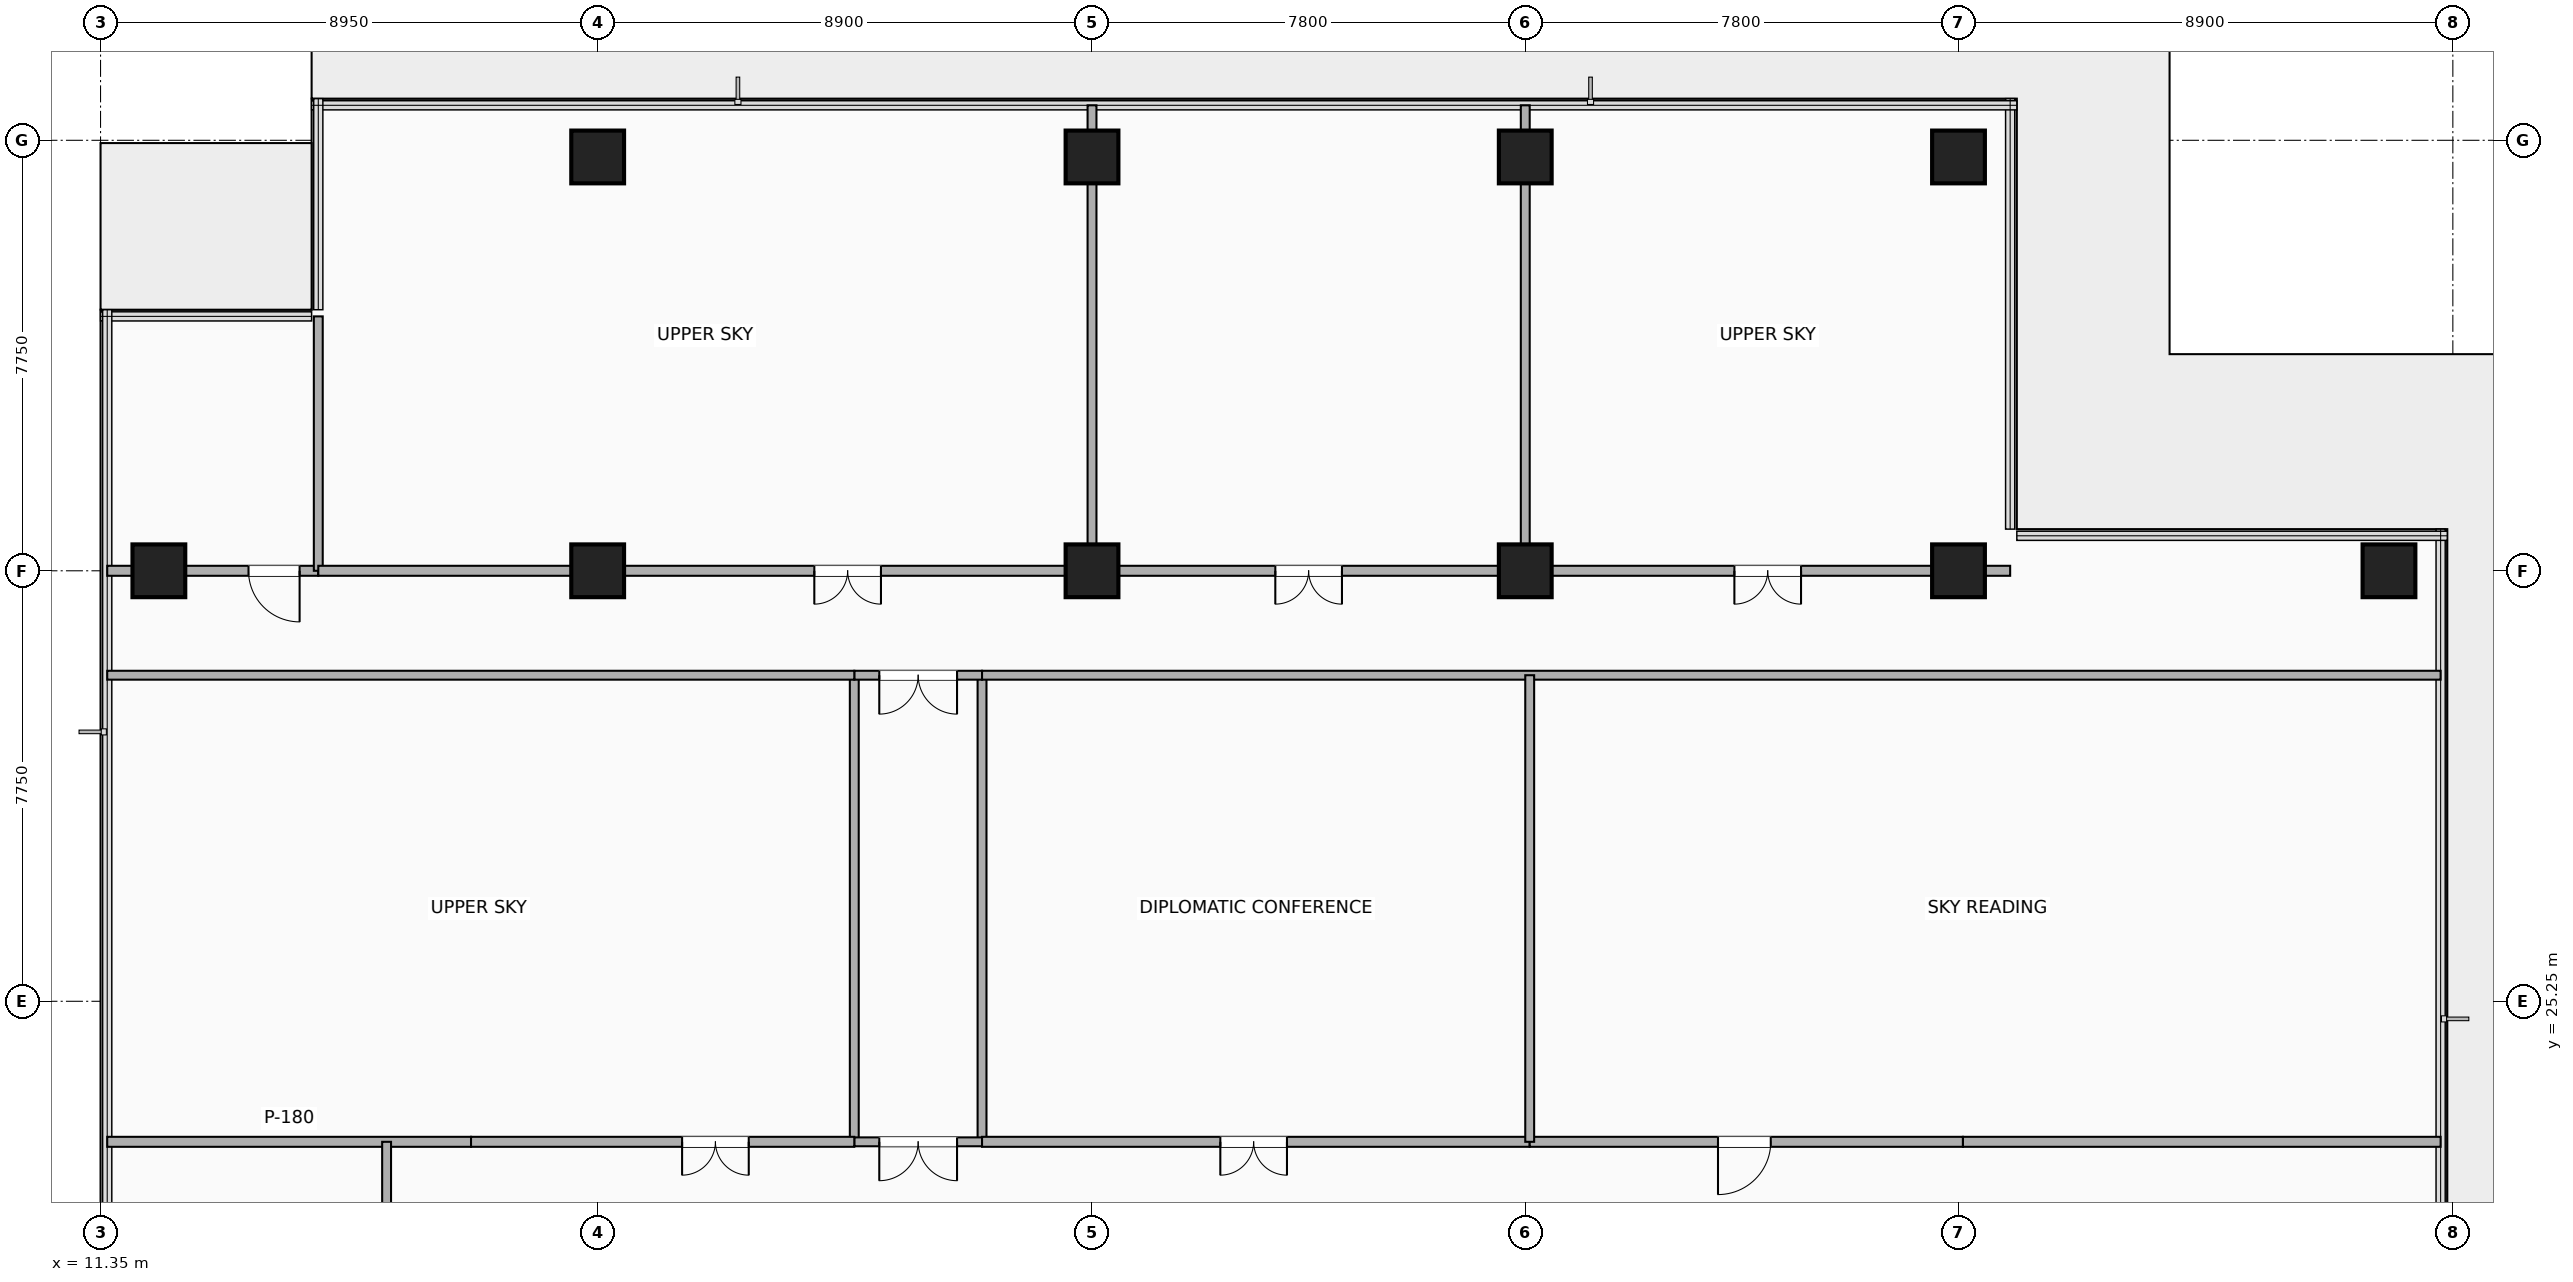
"""IFC4 building model, lengths in metres.
Left out: names, types, materials, properties, quantities, classifications, styles, units other than length and angle.
Written with IfcOpenShell. Run it as: python <this file> out.ifc"""

import sys

from ifc_helpers import new_model, si_unit, direction, frame, frame_2d, origin, origin_2d, place, context, subcontext, project, spatial, rectangle, extrude, element, fill, save


model = new_model("IFC4")
c1 = context("Model", 3, precision=1e-05, world=origin(), true_north=direction((0.0, 1.0)))
c2 = subcontext(c1, "Body", "Model", "MODEL_VIEW")
j1 = project(units=[si_unit("LENGTHUNIT", "METRE"), si_unit("PLANEANGLEUNIT", "RADIAN")], contexts=[c1])
p1 = place(None, origin())
s1 = spatial("IfcSite", under=j1, at=p1, CompositionType="ELEMENT")
p2 = place(p1, origin())
s2 = spatial("IfcBuilding", under=s1, at=p2, CompositionType="ELEMENT")
p3 = place(p2, frame((0.0, 0.0, 192.5)))
s3 = spatial("IfcBuildingStorey", under=s2, at=p3, CompositionType="ELEMENT", Elevation=192.5)
for number, where, z_axis, x_axis in (
    (1, (20.3, 33.0, -0.24), (0.0, 0.0, 1.0), (1.0, 0.0, 0.0)),
    (2, (29.2, 33.0, -0.24), (0.0, 0.0, 1.0), (1.0, 0.0, 0.0)),
    (3, (37.0, 33.0, -0.24), (0.0, 0.0, 1.0), (1.0, 0.0, 0.0)),
    (4, (44.8, 33.0, -0.24), (0.0, 0.0, 1.0), (1.0, 0.0, 0.0)),
    (5, (12.4, 33.0, -0.24), (0.0, 0.0, 1.0), (1.0, 0.0, 0.0)),
    (6, (52.55, 33.0, -0.24), (0.0, 0.0, 1.0), (1.0, 0.0, 0.0)),
    (7, (20.3, 40.45, -0.24), (0.0, 0.0, 1.0), (1.0, 0.0, 0.0)),
    (8, (29.2, 40.45, -0.24), (0.0, 0.0, 1.0), (1.0, 0.0, 0.0)),
    (9, (37.0, 40.45, -0.24), (0.0, 0.0, 1.0), (1.0, 0.0, 0.0)),
    (10, (44.8, 40.45, -0.24), (0.0, 0.0, 1.0), (1.0, 0.0, 0.0)),
):
    element("IfcColumn", number, at=place(p3, frame(where, z_axis=z_axis, x_axis=x_axis)), inside=s3, PredefinedType="COLUMN", context=c2, shape_type="SweptSolid", body=[
        extrude(rectangle(XDim=0.95, YDim=0.95, at=origin_2d()), origin(), (0.0, 0.0, 1.0), 4.4),
    ])
p4 = place(p3, frame((11.47, 22.72, 0.0), z_axis=(0.0, 0.0, 1.0), x_axis=(1.0, 0.0, 0.0)))
e11 = element("IfcWall", 11, at=p4, inside=s3, PredefinedType="PARTITIONING", context=c2, shape_type="SweptSolid", body=[
    extrude(rectangle(XDim=6.55, YDim=0.18, at=frame_2d((3.275, 0.0))), origin(), (0.0, 0.0, 1.0), 3.682),
])
p5 = place(p3, frame((16.5, 18.52, 0.0), z_axis=(0.0, 0.0, 1.0), x_axis=(0.0, 1.0, 0.0)))
e12 = element("IfcWall", 12, at=p5, inside=s3, PredefinedType="PARTITIONING", context=c2, shape_type="SweptSolid", body=[
    extrude(rectangle(XDim=4.2, YDim=0.16, at=frame_2d((2.1, 0.0))), origin(), (0.0, 0.0, 1.0), 3.372),
])
p6 = place(p5, frame((0.693, 0.0, 0.0)))
e13 = element("IfcOpeningElement", 13, at=p6, cuts=e12, PredefinedType="OPENING", context=c2, shape_type="SweptSolid", body=[
    extrude(rectangle(XDim=0.92, YDim=2.08, at=frame_2d((0.46, 1.04))), frame((0.0, 0.09, 0.0), z_axis=(0.0, -1.0, 0.0), x_axis=(1.0, 0.0, 0.0)), (0.0, 0.0, 1.0), 0.18),
])
p7 = place(p3, frame((11.47, 33.0, 0.0), z_axis=(0.0, 0.0, 1.0), x_axis=(1.0, 0.0, 0.0)))
e14 = element("IfcWall", 14, at=p7, inside=s3, PredefinedType="PARTITIONING", context=c2, shape_type="SweptSolid", body=[
    extrude(rectangle(XDim=3.8, YDim=0.18, at=frame_2d((1.9, 0.0))), origin(), (0.0, 0.0, 1.0), 3.372),
])
p8 = place(p7, frame((2.544, 0.0, 0.0)))
e15 = element("IfcOpeningElement", 15, at=p8, cuts=e14, PredefinedType="OPENING", context=c2, shape_type="SweptSolid", body=[
    extrude(rectangle(XDim=0.92, YDim=2.08, at=frame_2d((0.46, 1.04))), frame((0.0, 0.1, 0.0), z_axis=(0.0, -1.0, 0.0), x_axis=(1.0, 0.0, 0.0)), (0.0, 0.0, 1.0), 0.2),
])
p9 = place(p3, frame((15.27, 33.0, 0.0), z_axis=(0.0, 0.0, 1.0), x_axis=(0.0, 1.0, 0.0)))
e16 = element("IfcWall", 16, at=p9, inside=s3, PredefinedType="PARTITIONING", context=c2, shape_type="SweptSolid", body=[
    extrude(rectangle(XDim=4.58, YDim=0.16, at=frame_2d((2.29, 0.0))), origin(), (0.0, 0.0, 1.0), 3.372),
])
for number, where, z_axis, x_axis in (
    (17, (24.92, 22.72, 0.0), (0.0, 0.0, 1.0), (0.0, 1.0, 0.0)),
    (18, (27.22, 22.72, 0.0), (0.0, 0.0, 1.0), (0.0, 1.0, 0.0)),
):
    element("IfcWall", number, at=place(p3, frame(where, z_axis=z_axis, x_axis=x_axis)), inside=s3, PredefinedType="PARTITIONING", context=c2, shape_type="SweptSolid", body=[
        extrude(rectangle(XDim=8.4, YDim=0.16, at=frame_2d((4.2, 0.0))), origin(), (0.0, 0.0, 1.0), 3.787),
    ])
p10 = place(p3, frame((24.92, 22.72, 0.0), z_axis=(0.0, 0.0, 1.0), x_axis=(1.0, 0.0, 0.0)))
e19 = element("IfcWall", 19, at=p10, inside=s3, PredefinedType="PARTITIONING", context=c2, shape_type="SweptSolid", body=[
    extrude(rectangle(XDim=2.3, YDim=0.16, at=frame_2d((1.15, 0.0))), origin(), (0.0, 0.0, 1.0), 4.16),
])
p11 = place(p10, frame((0.45, 0.0, 0.0)))
e20 = element("IfcOpeningElement", 20, at=p11, cuts=e19, PredefinedType="OPENING", context=c2, shape_type="SweptSolid", body=[
    extrude(rectangle(XDim=1.4, YDim=2.2, at=frame_2d((0.7, 1.1))), frame((0.0, 0.09, 0.0), z_axis=(0.0, -1.0, 0.0), x_axis=(1.0, 0.0, 0.0)), (0.0, 0.0, 1.0), 0.18),
])
p12 = place(p3, frame((24.92, 31.12, 0.0), z_axis=(0.0, 0.0, 1.0), x_axis=(1.0, 0.0, 0.0)))
e21 = element("IfcWall", 21, at=p12, inside=s3, PredefinedType="PARTITIONING", context=c2, shape_type="SweptSolid", body=[
    extrude(rectangle(XDim=2.3, YDim=0.16, at=frame_2d((1.15, 0.0))), origin(), (0.0, 0.0, 1.0), 4.16),
])
p13 = place(p12, frame((0.45, 0.0, 0.0)))
e22 = element("IfcOpeningElement", 22, at=p13, cuts=e21, PredefinedType="OPENING", context=c2, shape_type="SweptSolid", body=[
    extrude(rectangle(XDim=1.4, YDim=2.2, at=frame_2d((0.7, 1.1))), frame((0.0, 0.09, 0.0), z_axis=(0.0, -1.0, 0.0), x_axis=(1.0, 0.0, 0.0)), (0.0, 0.0, 1.0), 0.18),
])
p14 = place(p3, frame((11.47, 31.12, 0.0), z_axis=(0.0, 0.0, 1.0), x_axis=(1.0, 0.0, 0.0)))
e23 = element("IfcWall", 23, at=p14, inside=s3, PredefinedType="PARTITIONING", context=c2, shape_type="SweptSolid", body=[
    extrude(rectangle(XDim=13.45, YDim=0.16, at=frame_2d((6.725, 0.0))), origin(), (0.0, 0.0, 1.0), 3.372),
])
p15 = place(p3, frame((27.22, 31.12, 0.0), z_axis=(0.0, 0.0, 1.0), x_axis=(1.0, 0.0, 0.0)))
e24 = element("IfcWall", 24, at=p15, inside=s3, PredefinedType="PARTITIONING", context=c2, shape_type="SweptSolid", body=[
    extrude(rectangle(XDim=26.26, YDim=0.16, at=frame_2d((13.13, 0.0))), origin(), (0.0, 0.0, 1.0), 3.372),
])
p16 = place(p3, frame((18.02, 22.72, 0.0), z_axis=(0.0, 0.0, 1.0), x_axis=(1.0, 0.0, 0.0)))
e25 = element("IfcWall", 25, at=p16, inside=s3, PredefinedType="PARTITIONING", context=c2, shape_type="SweptSolid", body=[
    extrude(rectangle(XDim=6.9, YDim=0.18, at=frame_2d((3.45, 0.0))), origin(), (0.0, 0.0, 1.0), 3.372),
])
p17 = place(p16, frame((3.8, 0.0, 0.0)))
e26 = element("IfcOpeningElement", 26, at=p17, cuts=e25, PredefinedType="OPENING", context=c2, shape_type="SweptSolid", body=[
    extrude(rectangle(XDim=1.2, YDim=2.14, at=frame_2d((0.6, 1.07))), frame((0.0, 0.1, 0.0), z_axis=(0.0, -1.0, 0.0), x_axis=(1.0, 0.0, 0.0)), (0.0, 0.0, 1.0), 0.2),
])
p18 = place(p3, frame((27.22, 22.72, 0.0), z_axis=(0.0, 0.0, 1.0), x_axis=(1.0, 0.0, 0.0)))
e27 = element("IfcWall", 27, at=p18, inside=s3, PredefinedType="PARTITIONING", context=c2, shape_type="SweptSolid", body=[
    extrude(rectangle(XDim=9.86, YDim=0.18, at=frame_2d((4.93, 0.0))), origin(), (0.0, 0.0, 1.0), 3.372),
])
p19 = place(p18, frame((4.29, 0.0, 0.0)))
e28 = element("IfcOpeningElement", 28, at=p19, cuts=e27, PredefinedType="OPENING", context=c2, shape_type="SweptSolid", body=[
    extrude(rectangle(XDim=1.2, YDim=2.14, at=frame_2d((0.6, 1.07))), frame((0.0, 0.1, 0.0), z_axis=(0.0, -1.0, 0.0), x_axis=(1.0, 0.0, 0.0)), (0.0, 0.0, 1.0), 0.2),
])
p20 = place(p3, frame((37.08, 22.72, 0.0), z_axis=(0.0, 0.0, 1.0), x_axis=(1.0, 0.0, 0.0)))
e29 = element("IfcWall", 29, at=p20, inside=s3, PredefinedType="PARTITIONING", context=c2, shape_type="SweptSolid", body=[
    extrude(rectangle(XDim=7.8, YDim=0.18, at=frame_2d((3.9, 0.0))), origin(), (0.0, 0.0, 1.0), 3.372),
])
p21 = place(p20, frame((3.39, 0.0, 0.0)))
e30 = element("IfcOpeningElement", 30, at=p21, cuts=e29, PredefinedType="OPENING", context=c2, shape_type="SweptSolid", body=[
    extrude(rectangle(XDim=0.95, YDim=2.15, at=frame_2d((0.475, 1.075))), frame((0.0, 0.1, 0.0), z_axis=(0.0, -1.0, 0.0), x_axis=(1.0, 0.0, 0.0)), (0.0, 0.0, 1.0), 0.2),
])
p22 = place(p3, frame((44.88, 22.72, 0.0), z_axis=(0.0, 0.0, 1.0), x_axis=(1.0, 0.0, 0.0)))
e31 = element("IfcWall", 31, at=p22, inside=s3, PredefinedType="PARTITIONING", context=c2, shape_type="SweptSolid", body=[
    extrude(rectangle(XDim=8.6, YDim=0.18, at=frame_2d((4.3, 0.0))), origin(), (0.0, 0.0, 1.0), 3.372),
])
p23 = place(p3, frame((37.08, 22.72, 0.0), z_axis=(0.0, 0.0, 1.0), x_axis=(0.0, 1.0, 0.0)))
e32 = element("IfcWall", 32, at=p23, inside=s3, PredefinedType="PARTITIONING", context=c2, shape_type="SweptSolid", body=[
    extrude(rectangle(XDim=8.4, YDim=0.16, at=frame_2d((4.2, 0.0))), origin(), (0.0, 0.0, 1.0), 3.372),
])
p24 = place(p3, frame((15.27, 33.0, 0.0), z_axis=(0.0, 0.0, 1.0), x_axis=(1.0, 0.0, 0.0)))
e33 = element("IfcWall", 33, at=p24, inside=s3, PredefinedType="PARTITIONING", context=c2, shape_type="SweptSolid", body=[
    extrude(rectangle(XDim=13.93, YDim=0.18, at=frame_2d((6.965, 0.0))), origin(), (0.0, 0.0, 1.0), 3.372),
])
p25 = place(p24, frame((8.93, 0.0, 0.0)))
e34 = element("IfcOpeningElement", 34, at=p25, cuts=e33, PredefinedType="OPENING", context=c2, shape_type="SweptSolid", body=[
    extrude(rectangle(XDim=1.2, YDim=2.14, at=frame_2d((0.6, 1.07))), frame((0.0, 0.1, 0.0), z_axis=(0.0, -1.0, 0.0), x_axis=(1.0, 0.0, 0.0)), (0.0, 0.0, 1.0), 0.2),
])
p26 = place(p3, frame((29.2, 33.0, 0.0), z_axis=(0.0, 0.0, 1.0), x_axis=(0.0, 1.0, 0.0)))
e35 = element("IfcWall", 35, at=p26, inside=s3, PredefinedType="PARTITIONING", context=c2, shape_type="SweptSolid", body=[
    extrude(rectangle(XDim=8.38, YDim=0.16, at=frame_2d((4.19, 0.0))), origin(), (0.0, 0.0, 1.0), 3.372),
])
p27 = place(p3, frame((29.2, 33.0, 0.0), z_axis=(0.0, 0.0, 1.0), x_axis=(1.0, 0.0, 0.0)))
e36 = element("IfcWall", 36, at=p27, inside=s3, PredefinedType="PARTITIONING", context=c2, shape_type="SweptSolid", body=[
    extrude(rectangle(XDim=7.8, YDim=0.18, at=frame_2d((3.9, 0.0))), origin(), (0.0, 0.0, 1.0), 3.372),
])
p28 = place(p27, frame((3.3, 0.0, 0.0)))
e37 = element("IfcOpeningElement", 37, at=p28, cuts=e36, PredefinedType="OPENING", context=c2, shape_type="SweptSolid", body=[
    extrude(rectangle(XDim=1.2, YDim=2.14, at=frame_2d((0.6, 1.07))), frame((0.0, 0.1, 0.0), z_axis=(0.0, -1.0, 0.0), x_axis=(1.0, 0.0, 0.0)), (0.0, 0.0, 1.0), 0.2),
])
p29 = place(p3, frame((37.0, 33.0, 0.0), z_axis=(0.0, 0.0, 1.0), x_axis=(0.0, 1.0, 0.0)))
e38 = element("IfcWall", 38, at=p29, inside=s3, PredefinedType="PARTITIONING", context=c2, shape_type="SweptSolid", body=[
    extrude(rectangle(XDim=8.38, YDim=0.16, at=frame_2d((4.19, 0.0))), origin(), (0.0, 0.0, 1.0), 3.372),
])
p30 = place(p3, frame((37.0, 33.0, 0.0), z_axis=(0.0, 0.0, 1.0), x_axis=(1.0, 0.0, 0.0)))
e39 = element("IfcWall", 39, at=p30, inside=s3, PredefinedType="PARTITIONING", context=c2, shape_type="SweptSolid", body=[
    extrude(rectangle(XDim=8.73, YDim=0.18, at=frame_2d((4.365, 0.0))), origin(), (0.0, 0.0, 1.0), 3.372),
])
p31 = place(p30, frame((3.765, 0.0, 0.0)))
e40 = element("IfcOpeningElement", 40, at=p31, cuts=e39, PredefinedType="OPENING", context=c2, shape_type="SweptSolid", body=[
    extrude(rectangle(XDim=1.2, YDim=2.14, at=frame_2d((0.6, 1.07))), frame((0.0, 0.1, 0.0), z_axis=(0.0, -1.0, 0.0), x_axis=(1.0, 0.0, 0.0)), (0.0, 0.0, 1.0), 0.2),
])
p32 = place(p8, origin())
e41 = element("IfcDoor", 41, at=p32, inside=s3, OperationType="SINGLE_SWING_RIGHT", PredefinedType="DOOR", context=c2, shape_type="SweptSolid", body=[
    extrude(rectangle(XDim=0.92, YDim=2.08, at=frame_2d((0.46, 1.04))), frame((0.0, 0.025, 0.0), z_axis=(0.0, -1.0, 0.0), x_axis=(1.0, 0.0, 0.0)), (0.0, 0.0, 1.0), 0.05),
])
fill(e15, e41)
p33 = place(p11, origin())
e42 = element("IfcDoor", 42, at=p33, inside=s3, OperationType="DOUBLE_DOOR_SINGLE_SWING", PredefinedType="DOOR", context=c2, shape_type="SweptSolid", body=[
    extrude(rectangle(XDim=1.4, YDim=2.2, at=frame_2d((0.7, 1.1))), frame((0.0, 0.025, 0.0), z_axis=(0.0, -1.0, 0.0), x_axis=(1.0, 0.0, 0.0)), (0.0, 0.0, 1.0), 0.05),
])
fill(e20, e42)
p34 = place(p13, origin())
e43 = element("IfcDoor", 43, at=p34, inside=s3, OperationType="DOUBLE_DOOR_SINGLE_SWING", PredefinedType="DOOR", context=c2, shape_type="SweptSolid", body=[
    extrude(rectangle(XDim=1.4, YDim=2.2, at=frame_2d((0.7, 1.1))), frame((0.0, 0.025, 0.0), z_axis=(0.0, -1.0, 0.0), x_axis=(1.0, 0.0, 0.0)), (0.0, 0.0, 1.0), 0.05),
])
fill(e22, e43)
p35 = place(p17, origin())
e44 = element("IfcDoor", 44, at=p35, inside=s3, OperationType="DOUBLE_DOOR_SINGLE_SWING", PredefinedType="DOOR", context=c2, shape_type="SweptSolid", body=[
    extrude(rectangle(XDim=1.2, YDim=2.14, at=frame_2d((0.6, 1.07))), frame((0.0, 0.025, 0.0), z_axis=(0.0, -1.0, 0.0), x_axis=(1.0, 0.0, 0.0)), (0.0, 0.0, 1.0), 0.05),
])
fill(e26, e44)
p36 = place(p19, origin())
e45 = element("IfcDoor", 45, at=p36, inside=s3, OperationType="DOUBLE_DOOR_SINGLE_SWING", PredefinedType="DOOR", context=c2, shape_type="SweptSolid", body=[
    extrude(rectangle(XDim=1.2, YDim=2.14, at=frame_2d((0.6, 1.07))), frame((0.0, 0.025, 0.0), z_axis=(0.0, -1.0, 0.0), x_axis=(1.0, 0.0, 0.0)), (0.0, 0.0, 1.0), 0.05),
])
fill(e28, e45)
p37 = place(p21, origin())
e46 = element("IfcDoor", 46, at=p37, inside=s3, OperationType="SINGLE_SWING_LEFT", PredefinedType="DOOR", context=c2, shape_type="SweptSolid", body=[
    extrude(rectangle(XDim=0.95, YDim=2.15, at=frame_2d((0.475, 1.075))), frame((0.0, 0.025, 0.0), z_axis=(0.0, -1.0, 0.0), x_axis=(1.0, 0.0, 0.0)), (0.0, 0.0, 1.0), 0.05),
])
fill(e30, e46)
p38 = place(p25, origin())
e47 = element("IfcDoor", 47, at=p38, inside=s3, OperationType="DOUBLE_DOOR_SINGLE_SWING", PredefinedType="DOOR", context=c2, shape_type="SweptSolid", body=[
    extrude(rectangle(XDim=1.2, YDim=2.14, at=frame_2d((0.6, 1.07))), frame((0.0, 0.025, 0.0), z_axis=(0.0, -1.0, 0.0), x_axis=(1.0, 0.0, 0.0)), (0.0, 0.0, 1.0), 0.05),
])
fill(e34, e47)
p39 = place(p28, origin())
e48 = element("IfcDoor", 48, at=p39, inside=s3, OperationType="DOUBLE_DOOR_SINGLE_SWING", PredefinedType="DOOR", context=c2, shape_type="SweptSolid", body=[
    extrude(rectangle(XDim=1.2, YDim=2.14, at=frame_2d((0.6, 1.07))), frame((0.0, 0.025, 0.0), z_axis=(0.0, -1.0, 0.0), x_axis=(1.0, 0.0, 0.0)), (0.0, 0.0, 1.0), 0.05),
])
fill(e37, e48)
p40 = place(p31, origin())
e49 = element("IfcDoor", 49, at=p40, inside=s3, OperationType="DOUBLE_DOOR_SINGLE_SWING", PredefinedType="DOOR", context=c2, shape_type="SweptSolid", body=[
    extrude(rectangle(XDim=1.2, YDim=2.14, at=frame_2d((0.6, 1.07))), frame((0.0, 0.025, 0.0), z_axis=(0.0, -1.0, 0.0), x_axis=(1.0, 0.0, 0.0)), (0.0, 0.0, 1.0), 0.05),
])
fill(e40, e49)
save(model, sys.argv[1])
